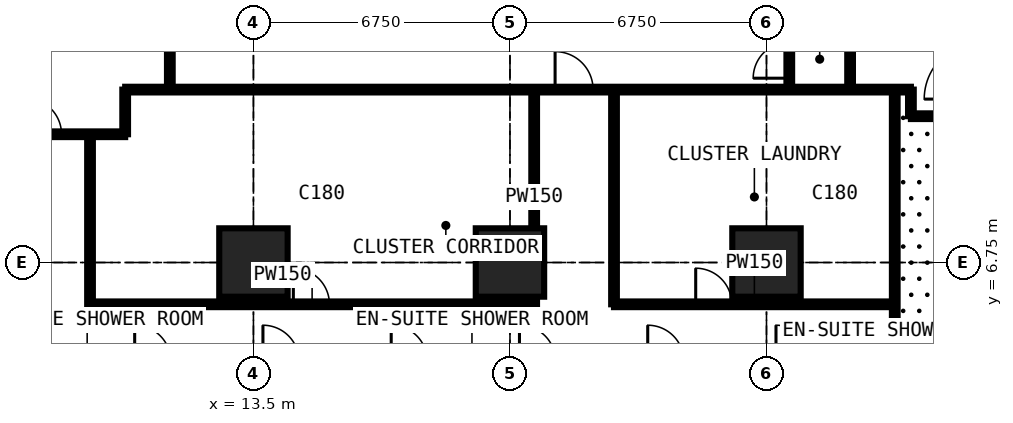
"""IFC4 building model, lengths in metres.
Left out: names, types, materials, properties, quantities, classifications, styles, units other than length and angle.
Written with IfcOpenShell. Run it as: python <this file> out.ifc"""

import sys

from ifc_helpers import new_model, si_unit, direction, frame, frame_2d, origin, origin_2d, place, context, subcontext, project, spatial, rectangle, extrude, element, fill, save


model = new_model("IFC4")
c1 = context("Model", 3, precision=1e-05, world=origin(), true_north=direction((0.0, 1.0)))
c2 = subcontext(c1, "Body", "Model", "MODEL_VIEW")
j1 = project(units=[si_unit("LENGTHUNIT", "METRE"), si_unit("PLANEANGLEUNIT", "RADIAN")], contexts=[c1])
p1 = place(None, origin())
s1 = spatial("IfcSite", under=j1, at=p1, CompositionType="ELEMENT")
p2 = place(p1, origin())
s2 = spatial("IfcBuilding", under=s1, at=p2, CompositionType="ELEMENT")
p3 = place(p2, frame((0.0, 0.0, 46.8)))
s3 = spatial("IfcBuildingStorey", under=s2, at=p3, CompositionType="ELEMENT", Elevation=46.8)
for number, where, z_axis, x_axis in (
    (1, (13.5, 6.75, 0.0), (0.0, 0.0, 1.0), (1.0, 0.0, 0.0)),
    (2, (20.25, 6.75, 0.0), (0.0, 0.0, 1.0), (1.0, 0.0, 0.0)),
    (3, (27.0, 6.75, 0.0), (0.0, 0.0, 1.0), (1.0, 0.0, 0.0)),
):
    element("IfcColumn", number, at=place(p3, frame(where, z_axis=z_axis, x_axis=x_axis)), inside=s3, PredefinedType="COLUMN", context=c2, shape_type="SweptSolid", body=[
        extrude(rectangle(XDim=1.8, YDim=1.8, at=origin_2d()), origin(), (0.0, 0.0, 1.0), 3.6),
    ])
p4 = place(p3, frame((-0.734, 10.125, 0.0), z_axis=(0.0, 0.0, 1.0), x_axis=(1.0, 0.0, 0.0)))
e4 = element("IfcWall", 4, at=p4, inside=s3, PredefinedType="PARTITIONING", context=c2, shape_type="SweptSolid", body=[
    extrude(rectangle(XDim=10.859, YDim=0.15, at=frame_2d((5.429, 0.0))), origin(), (0.0, 0.0, 1.0), 3.375),
])
p5 = place(p4, frame((5.134, 0.0, 0.0)))
e5 = element("IfcOpeningElement", 5, at=p5, cuts=e4, PredefinedType="OPENING", context=c2, shape_type="SweptSolid", body=[
    extrude(rectangle(XDim=1.0, YDim=2.2, at=frame_2d((0.5, 1.1))), frame((0.0, 0.085, 0.0), z_axis=(0.0, -1.0, 0.0), x_axis=(1.0, 0.0, 0.0)), (0.0, 0.0, 1.0), 0.17),
])
p6 = place(p4, frame((8.234, 0.0, 0.0)))
e6 = element("IfcOpeningElement", 6, at=p6, cuts=e4, PredefinedType="OPENING", context=c2, shape_type="SweptSolid", body=[
    extrude(rectangle(XDim=0.95, YDim=2.2, at=frame_2d((0.475, 1.1))), frame((0.0, 0.085, 0.0), z_axis=(0.0, -1.0, 0.0), x_axis=(1.0, 0.0, 0.0)), (0.0, 0.0, 1.0), 0.17),
])
p7 = place(p3, frame((9.2, 5.65, 0.0), z_axis=(0.0, 0.0, 1.0), x_axis=(0.0, 1.0, 0.0)))
e7 = element("IfcWall", 7, at=p7, inside=s3, PredefinedType="PARTITIONING", context=c2, shape_type="SweptSolid", body=[
    extrude(rectangle(XDim=4.475, YDim=0.15, at=frame_2d((2.238, 0.0))), origin(), (0.0, 0.0, 1.0), 3.375),
])
p8 = place(p3, frame((9.2, 5.65, 0.0), z_axis=(0.0, 0.0, 1.0), x_axis=(1.0, 0.0, 0.0)))
e8 = element("IfcWall", 8, at=p8, inside=s3, PredefinedType="PARTITIONING", context=c2, shape_type="SweptSolid", body=[
    extrude(rectangle(XDim=11.688, YDim=0.15, at=frame_2d((5.844, 0.0))), origin(), (0.0, 0.0, 1.0), 3.375),
])
p9 = place(p8, frame((5.35, 0.0, 0.0)))
e9 = element("IfcOpeningElement", 9, at=p9, cuts=e8, PredefinedType="OPENING", context=c2, shape_type="SweptSolid", body=[
    extrude(rectangle(XDim=0.95, YDim=2.2, at=frame_2d((0.475, 1.1))), frame((0.0, 0.085, 0.0), z_axis=(0.0, -1.0, 0.0), x_axis=(1.0, 0.0, 0.0)), (0.0, 0.0, 1.0), 0.17),
])
p10 = place(p3, frame((10.125, 10.125, 0.0), z_axis=(0.0, 0.0, 1.0), x_axis=(0.0, 1.0, 0.0)))
e10 = element("IfcWall", 10, at=p10, inside=s3, PredefinedType="PARTITIONING", context=c2, shape_type="SweptSolid", body=[
    extrude(rectangle(XDim=1.175, YDim=0.15, at=frame_2d((0.587, 0.0))), origin(), (0.0, 0.0, 1.0), 3.375),
])
p11 = place(p3, frame((10.125, 11.3, 0.0), z_axis=(0.0, 0.0, 1.0), x_axis=(1.0, 0.0, 0.0)))
e11 = element("IfcWall", 11, at=p11, inside=s3, PredefinedType="PARTITIONING", context=c2, shape_type="SweptSolid", body=[
    extrude(rectangle(XDim=20.675, YDim=0.15, at=frame_2d((10.337, 0.0))), origin(), (0.0, 0.0, 1.0), 3.375),
])
p12 = place(p11, frame((11.312, 0.0, 0.0)))
e12 = element("IfcOpeningElement", 12, at=p12, cuts=e11, PredefinedType="OPENING", context=c2, shape_type="SweptSolid", body=[
    extrude(rectangle(XDim=1.0, YDim=2.2, at=frame_2d((0.5, 1.1))), frame((0.0, 0.085, 0.0), z_axis=(0.0, -1.0, 0.0), x_axis=(1.0, 0.0, 0.0)), (0.0, 0.0, 1.0), 0.17),
])
p13 = place(p3, frame((11.3, 11.3, 0.0), z_axis=(0.0, 0.0, 1.0), x_axis=(0.0, 1.0, 0.0)))
e13 = element("IfcWall", 13, at=p13, inside=s3, PredefinedType="PARTITIONING", context=c2, shape_type="SweptSolid", body=[
    extrude(rectangle(XDim=19.075, YDim=0.15, at=frame_2d((9.538, 0.0))), origin(), (0.0, 0.0, 1.0), 3.375),
])
p14 = place(p13, frame((10.137, 0.0, 0.0)))
e14 = element("IfcOpeningElement", 14, at=p14, cuts=e13, PredefinedType="OPENING", context=c2, shape_type="SweptSolid", body=[
    extrude(rectangle(XDim=1.0, YDim=2.2, at=frame_2d((0.5, 1.1))), frame((0.0, 0.085, 0.0), z_axis=(0.0, -1.0, 0.0), x_axis=(1.0, 0.0, 0.0)), (0.0, 0.0, 1.0), 0.17),
])
p15 = place(p3, frame((20.887, 5.65, 0.0), z_axis=(0.0, 0.0, 1.0), x_axis=(0.0, 1.0, 0.0)))
e15 = element("IfcWall", 15, at=p15, inside=s3, PredefinedType="PARTITIONING", context=c2, shape_type="SweptSolid", body=[
    extrude(rectangle(XDim=5.65, YDim=0.15, at=frame_2d((2.825, 0.0))), origin(), (0.0, 0.0, 1.0), 3.375),
])
p16 = place(p3, frame((22.988, 5.65, 0.0), z_axis=(0.0, 0.0, 1.0), x_axis=(1.0, 0.0, 0.0)))
e16 = element("IfcWall", 16, at=p16, inside=s3, PredefinedType="PARTITIONING", context=c2, shape_type="SweptSolid", body=[
    extrude(rectangle(XDim=7.387, YDim=0.15, at=frame_2d((3.694, 0.0))), origin(), (0.0, 0.0, 1.0), 3.375),
])
p17 = place(p16, frame((2.15, 0.0, 0.0)))
e17 = element("IfcOpeningElement", 17, at=p17, cuts=e16, PredefinedType="OPENING", context=c2, shape_type="SweptSolid", body=[
    extrude(rectangle(XDim=0.95, YDim=2.2, at=frame_2d((0.475, 1.1))), frame((0.0, 0.085, 0.0), z_axis=(0.0, -1.0, 0.0), x_axis=(1.0, 0.0, 0.0)), (0.0, 0.0, 1.0), 0.17),
])
p18 = place(p3, frame((22.988, 5.65, 0.0), z_axis=(0.0, 0.0, 1.0), x_axis=(0.0, 1.0, 0.0)))
e18 = element("IfcWall", 18, at=p18, inside=s3, PredefinedType="PARTITIONING", context=c2, shape_type="SweptSolid", body=[
    extrude(rectangle(XDim=5.65, YDim=0.15, at=frame_2d((2.825, 0.0))), origin(), (0.0, 0.0, 1.0), 3.375),
])
p19 = place(p3, frame((27.6, 11.3, 0.0), z_axis=(0.0, 0.0, 1.0), x_axis=(0.0, 1.0, 0.0)))
e19 = element("IfcWall", 19, at=p19, inside=s3, PredefinedType="PARTITIONING", context=c2, shape_type="SweptSolid", body=[
    extrude(rectangle(XDim=1.6, YDim=0.15, at=frame_2d((0.8, 0.0))), origin(), (0.0, 0.0, 1.0), 3.375),
])
p20 = place(p19, frame((0.3, 0.0, 0.0)))
e20 = element("IfcOpeningElement", 20, at=p20, cuts=e19, PredefinedType="OPENING", context=c2, shape_type="SweptSolid", body=[
    extrude(rectangle(XDim=0.95, YDim=2.2, at=frame_2d((0.475, 1.1))), frame((0.0, 0.085, 0.0), z_axis=(0.0, -1.0, 0.0), x_axis=(1.0, 0.0, 0.0)), (0.0, 0.0, 1.0), 0.17),
])
p21 = place(p3, frame((29.2, 11.3, 0.0), z_axis=(0.0, 0.0, 1.0), x_axis=(0.0, 1.0, 0.0)))
e21 = element("IfcWall", 21, at=p21, inside=s3, PredefinedType="PARTITIONING", context=c2, shape_type="SweptSolid", body=[
    extrude(rectangle(XDim=20.3, YDim=0.15, at=frame_2d((10.15, 0.0))), origin(), (0.0, 0.0, 1.0), 3.375),
])
p22 = place(p21, frame((8.35, 0.0, 0.0)))
e22 = element("IfcOpeningElement", 22, at=p22, cuts=e21, PredefinedType="OPENING", context=c2, shape_type="SweptSolid", body=[
    extrude(rectangle(XDim=1.2, YDim=2.2, at=frame_2d((0.6, 1.1))), frame((0.0, 0.085, 0.0), z_axis=(0.0, -1.0, 0.0), x_axis=(1.0, 0.0, 0.0)), (0.0, 0.0, 1.0), 0.17),
])
p23 = place(p3, frame((30.375, -0.734, 0.0), z_axis=(0.0, 0.0, 1.0), x_axis=(0.0, 1.0, 0.0)))
e23 = element("IfcWall", 23, at=p23, inside=s3, PredefinedType="PARTITIONING", context=c2, shape_type="SweptSolid", body=[
    extrude(rectangle(XDim=12.034, YDim=0.15, at=frame_2d((6.017, 0.0))), origin(), (0.0, 0.0, 1.0), 3.375),
])
p24 = place(p3, frame((30.8, 10.6, 0.0), z_axis=(0.0, 0.0, 1.0), x_axis=(0.0, 1.0, 0.0)))
e24 = element("IfcWall", 24, at=p24, inside=s3, PredefinedType="PARTITIONING", context=c2, shape_type="SweptSolid", body=[
    extrude(rectangle(XDim=0.7, YDim=0.15, at=frame_2d((0.35, 0.0))), origin(), (0.0, 0.0, 1.0), 3.375),
])
p25 = place(p3, frame((30.8, 10.6, 0.0), z_axis=(0.0, 0.0, 1.0), x_axis=(1.0, 0.0, 0.0)))
e25 = element("IfcWall", 25, at=p25, inside=s3, PredefinedType="PARTITIONING", context=c2, shape_type="SweptSolid", body=[
    extrude(rectangle(XDim=1.85, YDim=0.15, at=frame_2d((0.925, 0.0))), origin(), (0.0, 0.0, 1.0), 3.375),
])
p26 = place(p20, origin())
e26 = element("IfcDoor", 26, at=p26, inside=s3, OperationType="SINGLE_SWING_LEFT", PredefinedType="DOOR", context=c2, shape_type="SweptSolid", body=[
    extrude(rectangle(XDim=0.95, YDim=2.2, at=frame_2d((0.475, 1.1))), frame((0.0, 0.025, 0.0), z_axis=(0.0, -1.0, 0.0), x_axis=(1.0, 0.0, 0.0)), (0.0, 0.0, 1.0), 0.05),
])
fill(e20, e26)
p27 = place(p12, origin())
e27 = element("IfcDoor", 27, at=p27, inside=s3, OperationType="SINGLE_SWING_LEFT", PredefinedType="DOOR", context=c2, shape_type="SweptSolid", body=[
    extrude(rectangle(XDim=1.0, YDim=2.2, at=frame_2d((0.5, 1.1))), frame((0.0, 0.025, 0.0), z_axis=(0.0, -1.0, 0.0), x_axis=(1.0, 0.0, 0.0)), (0.0, 0.0, 1.0), 0.05),
])
fill(e12, e27)
p28 = place(p17, origin())
e28 = element("IfcDoor", 28, at=p28, inside=s3, OperationType="SINGLE_SWING_LEFT", PredefinedType="DOOR", context=c2, shape_type="SweptSolid", body=[
    extrude(rectangle(XDim=0.95, YDim=2.2, at=frame_2d((0.475, 1.1))), frame((0.0, 0.025, 0.0), z_axis=(0.0, -1.0, 0.0), x_axis=(1.0, 0.0, 0.0)), (0.0, 0.0, 1.0), 0.05),
])
fill(e17, e28)
p29 = place(p9, origin())
e29 = element("IfcDoor", 29, at=p29, inside=s3, OperationType="SINGLE_SWING_LEFT", PredefinedType="DOOR", context=c2, shape_type="SweptSolid", body=[
    extrude(rectangle(XDim=0.95, YDim=2.2, at=frame_2d((0.475, 1.1))), frame((0.0, 0.025, 0.0), z_axis=(0.0, -1.0, 0.0), x_axis=(1.0, 0.0, 0.0)), (0.0, 0.0, 1.0), 0.05),
])
fill(e9, e29)
p30 = place(p6, origin())
e30 = element("IfcDoor", 30, at=p30, inside=s3, OperationType="SINGLE_SWING_LEFT", PredefinedType="DOOR", context=c2, shape_type="SweptSolid", body=[
    extrude(rectangle(XDim=0.95, YDim=2.2, at=frame_2d((0.475, 1.1))), frame((0.0, 0.025, 0.0), z_axis=(0.0, -1.0, 0.0), x_axis=(1.0, 0.0, 0.0)), (0.0, 0.0, 1.0), 0.05),
])
fill(e6, e30)
save(model, sys.argv[1])
